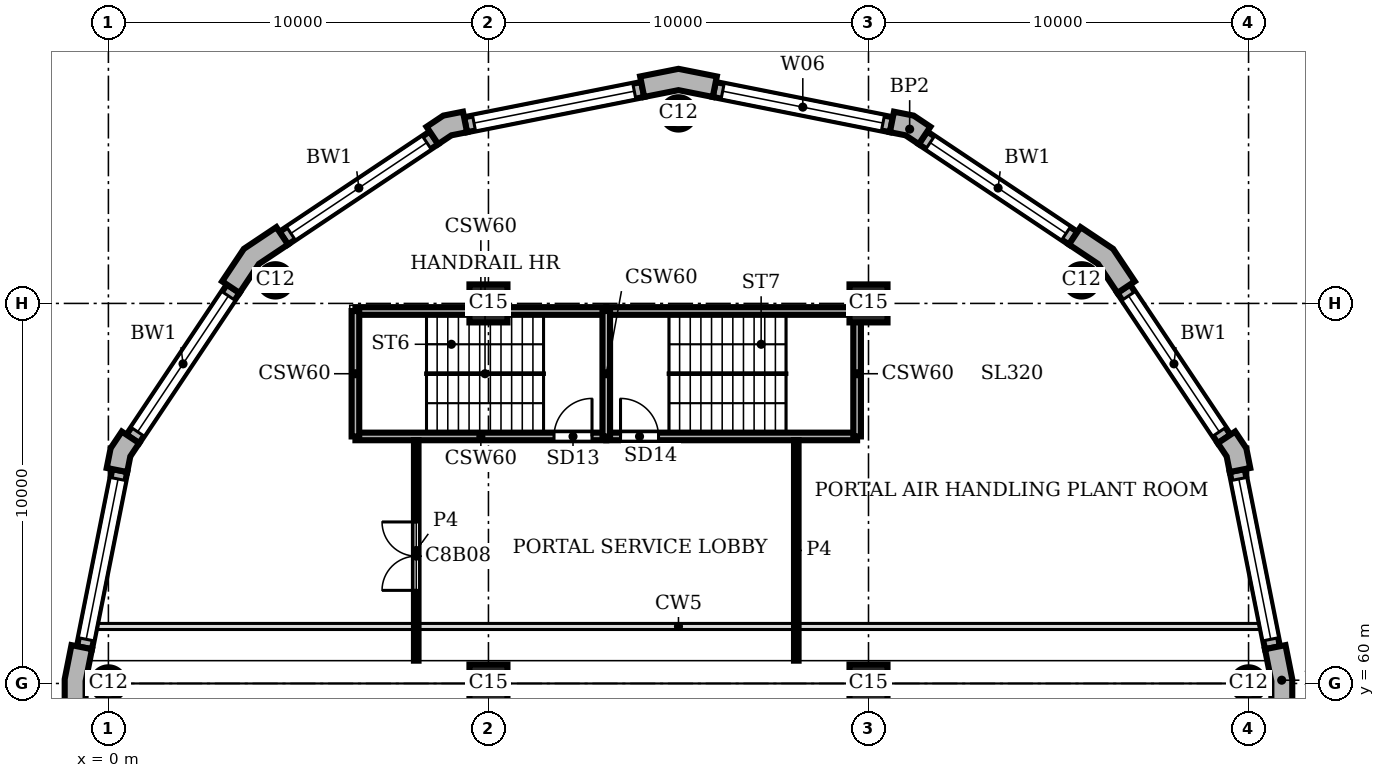
"""IFC4 building model, lengths in metres.
Left out: names, types, materials, properties, quantities, classifications, styles, units other than length and angle.
Written with IfcOpenShell. Run it as: python <this file> out.ifc"""

import sys

from ifc_helpers import new_model, si_unit, direction, frame, frame_2d, origin, origin_2d, place, context, subcontext, project, spatial, polyline, rectangle, circle, outline, extrude, element, fill, save


model = new_model("IFC4")
c1 = context("Model", 3, precision=1e-05, world=origin(), true_north=direction((0.0, 1.0)))
c2 = subcontext(c1, "Body", "Model", "MODEL_VIEW")
j1 = project(units=[si_unit("LENGTHUNIT", "METRE"), si_unit("PLANEANGLEUNIT", "RADIAN")], contexts=[c1])
p1 = place(None, origin())
s1 = spatial("IfcSite", under=j1, at=p1, CompositionType="ELEMENT")
p2 = place(p1, origin())
s2 = spatial("IfcBuilding", under=s1, at=p2, CompositionType="ELEMENT")
p3 = place(p2, frame((0.0, 0.0, 329.4)))
s3 = spatial("IfcBuildingStorey", under=s2, at=p3, CompositionType="ELEMENT", Elevation=329.4)
for number, where, z_axis, x_axis in (
    (1, (30.0, 60.0, 0.0), (0.0, 0.0, 1.0), (1.0, 0.0, 0.0)),
    (2, (25.607, 70.607, 0.0), (0.0, 0.0, 1.0), (1.0, 0.0, 0.0)),
    (3, (15.0, 75.0, 0.0), (0.0, 0.0, 1.0), (1.0, 0.0, 0.0)),
    (4, (4.393, 70.607, 0.0), (0.0, 0.0, 1.0), (1.0, 0.0, 0.0)),
    (5, (0.0, 60.0, 0.0), (0.0, 0.0, 1.0), (1.0, 0.0, 0.0)),
):
    element("IfcColumn", number, at=place(p3, frame(where, z_axis=z_axis, x_axis=x_axis)), inside=s3, PredefinedType="COLUMN", context=c2, shape_type="SweptSolid", body=[
        extrude(circle(Radius=0.425, at=origin_2d()), origin(), (0.0, 0.0, 1.0), 3.9),
    ])
for number, where, z_axis, x_axis in (
    (6, (10.0, 60.0, 0.0), (0.0, 0.0, 1.0), (1.0, 0.0, 0.0)),
    (7, (10.0, 70.0, 0.0), (0.0, 0.0, 1.0), (1.0, 0.0, 0.0)),
    (8, (20.0, 60.0, 0.0), (0.0, 0.0, 1.0), (1.0, 0.0, 0.0)),
    (9, (20.0, 70.0, 0.0), (0.0, 0.0, 1.0), (1.0, 0.0, 0.0)),
):
    element("IfcColumn", number, at=place(p3, frame(where, z_axis=z_axis, x_axis=x_axis)), inside=s3, PredefinedType="COLUMN", context=c2, shape_type="SweptSolid", body=[
        extrude(rectangle(XDim=1.0, YDim=1.0, at=origin_2d()), origin(), (0.0, 0.0, 1.0), 3.9),
    ])
p4 = place(p3, origin())
e10 = element("IfcWall", 10, at=p4, inside=s3, PredefinedType="SOLIDWALL", context=c2, shape_type="SweptSolid", body=[
    extrude(outline(polyline([(31.0, 59.2), (31.15, 59.2), (31.15, 60.113), (30.972, 61.009), (30.825, 60.98), (30.432, 60.902), (30.6, 60.059), (30.6, 59.2), (31.0, 59.2)])), origin(), (0.0, 0.0, 1.0), 3.9),
])
e11 = element("IfcWall", 11, at=p4, inside=s3, PredefinedType="SOLIDWALL", context=c2, shape_type="SweptSolid", body=[
    extrude(outline(polyline([(29.897, 65.641), (30.045, 65.67), (29.941, 66.189), (29.648, 66.629), (29.523, 66.545), (29.19, 66.323), (29.423, 65.974), (29.505, 65.563), (29.897, 65.641)])), origin(), (0.0, 0.0, 1.0), 3.9),
])
e12 = element("IfcWall", 12, at=p4, inside=s3, PredefinedType="SOLIDWALL", context=c2, shape_type="SweptSolid", body=[
    extrude(outline(polyline([(26.883, 70.497), (27.007, 70.58), (26.436, 71.436), (25.58, 72.007), (25.497, 71.883), (25.275, 71.55), (26.039, 71.039), (26.55, 70.275), (26.883, 70.497)])), origin(), (0.0, 0.0, 1.0), 3.9),
])
e13 = element("IfcWall", 13, at=p4, inside=s3, PredefinedType="SOLIDWALL", context=c2, shape_type="SweptSolid", body=[
    extrude(outline(polyline([(21.545, 74.523), (21.629, 74.648), (21.189, 74.941), (20.67, 75.045), (20.641, 74.897), (20.563, 74.505), (20.974, 74.423), (21.323, 74.19), (21.545, 74.523)])), origin(), (0.0, 0.0, 1.0), 3.9),
])
e14 = element("IfcWall", 14, at=p4, inside=s3, PredefinedType="SOLIDWALL", context=c2, shape_type="SweptSolid", body=[
    extrude(outline(polyline([(15.98, 75.825), (16.009, 75.972), (15.0, 76.173), (13.991, 75.972), (14.02, 75.825), (14.098, 75.432), (15.0, 75.612), (15.902, 75.432), (15.98, 75.825)])), origin(), (0.0, 0.0, 1.0), 3.9),
])
e15 = element("IfcWall", 15, at=p4, inside=s3, PredefinedType="SOLIDWALL", context=c2, shape_type="SweptSolid", body=[
    extrude(outline(polyline([(9.359, 74.897), (9.33, 75.045), (8.811, 74.941), (8.371, 74.648), (8.455, 74.523), (8.677, 74.19), (9.026, 74.423), (9.437, 74.505), (9.359, 74.897)])), origin(), (0.0, 0.0, 1.0), 3.9),
])
e16 = element("IfcWall", 16, at=p4, inside=s3, PredefinedType="SOLIDWALL", context=c2, shape_type="SweptSolid", body=[
    extrude(outline(polyline([(4.503, 71.883), (4.42, 72.007), (3.564, 71.436), (2.993, 70.58), (3.117, 70.497), (3.45, 70.275), (3.961, 71.039), (4.725, 71.55), (4.503, 71.883)])), origin(), (0.0, 0.0, 1.0), 3.9),
])
e17 = element("IfcWall", 17, at=p4, inside=s3, PredefinedType="SOLIDWALL", context=c2, shape_type="SweptSolid", body=[
    extrude(outline(polyline([(0.477, 66.545), (0.352, 66.629), (0.059, 66.189), (-0.045, 65.67), (0.103, 65.641), (0.495, 65.563), (0.577, 65.974), (0.81, 66.323), (0.477, 66.545)])), origin(), (0.0, 0.0, 1.0), 3.9),
])
e18 = element("IfcWall", 18, at=p4, inside=s3, PredefinedType="SOLIDWALL", context=c2, shape_type="SweptSolid", body=[
    extrude(outline(polyline([(-0.825, 60.98), (-0.972, 61.009), (-1.15, 60.113), (-1.15, 59.2), (-1.0, 59.2), (-0.6, 59.2), (-0.6, 60.059), (-0.432, 60.902), (-0.825, 60.98)])), origin(), (0.0, 0.0, 1.0), 3.9),
])
p5 = place(p3, frame((30.629, 60.941, 0.0), z_axis=(0.0, 0.0, 1.0), x_axis=(-0.195098533057, 0.98078364709, 0.0)))
e19 = element("IfcWall", 19, at=p5, inside=s3, PredefinedType="SOLIDWALL", context=c2, shape_type="SweptSolid", body=[
    extrude(rectangle(XDim=4.753, YDim=0.4, at=frame_2d((2.376, 0.0))), origin(), (0.0, 0.0, 1.0), 3.9),
])
p6 = place(p5, frame((0.226, 0.0, 0.9)))
e20 = element("IfcOpeningElement", 20, at=p6, cuts=e19, PredefinedType="OPENING", context=c2, shape_type="SweptSolid", body=[
    extrude(rectangle(XDim=4.3, YDim=2.35, at=frame_2d((2.15, 1.175))), frame((0.0, 0.21, 0.0), z_axis=(0.0, -1.0, 0.0), x_axis=(1.0, 0.0, 0.0)), (0.0, 0.0, 1.0), 0.42),
])
p7 = place(p3, frame((29.357, 66.434, 0.0), z_axis=(0.0, 0.0, 1.0), x_axis=(-0.555541552266, 0.831488775454, 0.0)))
e21 = element("IfcWall", 21, at=p7, inside=s3, PredefinedType="SOLIDWALL", context=c2, shape_type="SweptSolid", body=[
    extrude(rectangle(XDim=4.753, YDim=0.4, at=frame_2d((2.376, 0.0))), origin(), (0.0, 0.0, 1.0), 3.9),
])
p8 = place(p7, frame((0.226, 0.0, 0.9)))
e22 = element("IfcOpeningElement", 22, at=p8, cuts=e21, PredefinedType="OPENING", context=c2, shape_type="SweptSolid", body=[
    extrude(rectangle(XDim=4.3, YDim=2.35, at=frame_2d((2.15, 1.175))), frame((0.0, 0.21, 0.0), z_axis=(0.0, -1.0, 0.0), x_axis=(1.0, 0.0, 0.0)), (0.0, 0.0, 1.0), 0.42),
])
p9 = place(p3, frame((25.386, 71.716, 0.0), z_axis=(0.0, 0.0, 1.0), x_axis=(-0.831488775454, 0.555541552266, 0.0)))
e23 = element("IfcWall", 23, at=p9, inside=s3, PredefinedType="SOLIDWALL", context=c2, shape_type="SweptSolid", body=[
    extrude(rectangle(XDim=4.753, YDim=0.4, at=frame_2d((2.376, 0.0))), origin(), (0.0, 0.0, 1.0), 3.9),
])
p10 = place(p9, frame((0.226, 0.0, 0.9)))
e24 = element("IfcOpeningElement", 24, at=p10, cuts=e23, PredefinedType="OPENING", context=c2, shape_type="SweptSolid", body=[
    extrude(rectangle(XDim=4.3, YDim=2.35, at=frame_2d((2.15, 1.175))), frame((0.0, 0.21, 0.0), z_axis=(0.0, -1.0, 0.0), x_axis=(1.0, 0.0, 0.0)), (0.0, 0.0, 1.0), 0.42),
])
p11 = place(p3, frame((20.602, 74.701, 0.0), z_axis=(0.0, 0.0, 1.0), x_axis=(-0.98078364709, 0.195098533057, 0.0)))
e25 = element("IfcWall", 25, at=p11, inside=s3, PredefinedType="SOLIDWALL", context=c2, shape_type="SweptSolid", body=[
    extrude(rectangle(XDim=4.753, YDim=0.4, at=frame_2d((2.376, 0.0))), origin(), (0.0, 0.0, 1.0), 3.9),
])
p12 = place(p11, frame((0.226, 0.0, 0.9)))
e26 = element("IfcOpeningElement", 26, at=p12, cuts=e25, PredefinedType="OPENING", context=c2, shape_type="SweptSolid", body=[
    extrude(rectangle(XDim=4.3, YDim=2.35, at=frame_2d((2.15, 1.175))), frame((0.0, 0.21, 0.0), z_axis=(0.0, -1.0, 0.0), x_axis=(1.0, 0.0, 0.0)), (0.0, 0.0, 1.0), 0.42),
])
p13 = place(p3, frame((14.059, 75.629, 0.0), z_axis=(0.0, 0.0, 1.0), x_axis=(-0.98078364709, -0.195098533057, 0.0)))
e27 = element("IfcWall", 27, at=p13, inside=s3, PredefinedType="SOLIDWALL", context=c2, shape_type="SweptSolid", body=[
    extrude(rectangle(XDim=4.753, YDim=0.4, at=frame_2d((2.376, 0.0))), origin(), (0.0, 0.0, 1.0), 3.9),
])
p14 = place(p13, frame((0.226, 0.0, 0.9)))
e28 = element("IfcOpeningElement", 28, at=p14, cuts=e27, PredefinedType="OPENING", context=c2, shape_type="SweptSolid", body=[
    extrude(rectangle(XDim=4.3, YDim=2.35, at=frame_2d((2.15, 1.175))), frame((0.0, 0.21, 0.0), z_axis=(0.0, -1.0, 0.0), x_axis=(1.0, 0.0, 0.0)), (0.0, 0.0, 1.0), 0.42),
])
p15 = place(p3, frame((8.566, 74.357, 0.0), z_axis=(0.0, 0.0, 1.0), x_axis=(-0.831488775454, -0.555541552266, 0.0)))
e29 = element("IfcWall", 29, at=p15, inside=s3, PredefinedType="SOLIDWALL", context=c2, shape_type="SweptSolid", body=[
    extrude(rectangle(XDim=4.753, YDim=0.4, at=frame_2d((2.376, 0.0))), origin(), (0.0, 0.0, 1.0), 3.9),
])
p16 = place(p15, frame((0.226, 0.0, 0.9)))
e30 = element("IfcOpeningElement", 30, at=p16, cuts=e29, PredefinedType="OPENING", context=c2, shape_type="SweptSolid", body=[
    extrude(rectangle(XDim=4.3, YDim=2.35, at=frame_2d((2.15, 1.175))), frame((0.0, 0.21, 0.0), z_axis=(0.0, -1.0, 0.0), x_axis=(1.0, 0.0, 0.0)), (0.0, 0.0, 1.0), 0.42),
])
p17 = place(p3, frame((3.284, 70.386, 0.0), z_axis=(0.0, 0.0, 1.0), x_axis=(-0.555541552266, -0.831488775454, 0.0)))
e31 = element("IfcWall", 31, at=p17, inside=s3, PredefinedType="SOLIDWALL", context=c2, shape_type="SweptSolid", body=[
    extrude(rectangle(XDim=4.753, YDim=0.4, at=frame_2d((2.376, 0.0))), origin(), (0.0, 0.0, 1.0), 3.9),
])
p18 = place(p17, frame((0.226, 0.0, 0.9)))
e32 = element("IfcOpeningElement", 32, at=p18, cuts=e31, PredefinedType="OPENING", context=c2, shape_type="SweptSolid", body=[
    extrude(rectangle(XDim=4.3, YDim=2.35, at=frame_2d((2.15, 1.175))), frame((0.0, 0.21, 0.0), z_axis=(0.0, -1.0, 0.0), x_axis=(1.0, 0.0, 0.0)), (0.0, 0.0, 1.0), 0.42),
])
p19 = place(p3, frame((0.299, 65.602, 0.0), z_axis=(0.0, 0.0, 1.0), x_axis=(-0.195098533057, -0.98078364709, 0.0)))
e33 = element("IfcWall", 33, at=p19, inside=s3, PredefinedType="SOLIDWALL", context=c2, shape_type="SweptSolid", body=[
    extrude(rectangle(XDim=4.753, YDim=0.4, at=frame_2d((2.376, 0.0))), origin(), (0.0, 0.0, 1.0), 3.9),
])
p20 = place(p19, frame((0.226, 0.0, 0.9)))
e34 = element("IfcOpeningElement", 34, at=p20, cuts=e33, PredefinedType="OPENING", context=c2, shape_type="SweptSolid", body=[
    extrude(rectangle(XDim=4.3, YDim=2.35, at=frame_2d((2.15, 1.175))), frame((0.0, 0.21, 0.0), z_axis=(0.0, -1.0, 0.0), x_axis=(1.0, 0.0, 0.0)), (0.0, 0.0, 1.0), 0.42),
])
p21 = place(p3, frame((6.5, 66.5, 0.0), z_axis=(0.0, 0.0, 1.0), x_axis=(1.0, 0.0, 0.0)))
e35 = element("IfcWall", 35, at=p21, inside=s3, PredefinedType="SHEAR", context=c2, shape_type="SweptSolid", body=[
    extrude(rectangle(XDim=6.6, YDim=0.2, at=frame_2d((3.3, 0.0))), origin(), (0.0, 0.0, 1.0), 3.45),
])
p22 = place(p21, frame((5.225, 0.0, 0.0)))
e36 = element("IfcOpeningElement", 36, at=p22, cuts=e35, PredefinedType="OPENING", context=c2, shape_type="SweptSolid", body=[
    extrude(rectangle(XDim=1.0, YDim=2.1, at=frame_2d((0.5, 1.05))), frame((0.0, 0.11, 0.0), z_axis=(0.0, -1.0, 0.0), x_axis=(1.0, 0.0, 0.0)), (0.0, 0.0, 1.0), 0.22),
])
p23 = place(p3, frame((13.1, 66.5, 0.0), z_axis=(0.0, 0.0, 1.0), x_axis=(1.0, 0.0, 0.0)))
e37 = element("IfcWall", 37, at=p23, inside=s3, PredefinedType="SHEAR", context=c2, shape_type="SweptSolid", body=[
    extrude(rectangle(XDim=6.6, YDim=0.2, at=frame_2d((3.3, 0.0))), origin(), (0.0, 0.0, 1.0), 3.45),
])
p24 = place(p23, frame((0.375, 0.0, 0.0)))
e38 = element("IfcOpeningElement", 38, at=p24, cuts=e37, PredefinedType="OPENING", context=c2, shape_type="SweptSolid", body=[
    extrude(rectangle(XDim=1.0, YDim=2.1, at=frame_2d((0.5, 1.05))), frame((0.0, 0.11, 0.0), z_axis=(0.0, -1.0, 0.0), x_axis=(1.0, 0.0, 0.0)), (0.0, 0.0, 1.0), 0.22),
])
p25 = place(p3, frame((6.5, 69.8, 0.0), z_axis=(0.0, 0.0, 1.0), x_axis=(1.0, 0.0, 0.0)))
e39 = element("IfcWall", 39, at=p25, inside=s3, PredefinedType="SHEAR", context=c2, shape_type="SweptSolid", body=[
    extrude(rectangle(XDim=6.6, YDim=0.2, at=frame_2d((3.3, 0.0))), origin(), (0.0, 0.0, 1.0), 3.45),
])
p26 = place(p3, frame((13.1, 69.8, 0.0), z_axis=(0.0, 0.0, 1.0), x_axis=(1.0, 0.0, 0.0)))
e40 = element("IfcWall", 40, at=p26, inside=s3, PredefinedType="SHEAR", context=c2, shape_type="SweptSolid", body=[
    extrude(rectangle(XDim=6.6, YDim=0.2, at=frame_2d((3.3, 0.0))), origin(), (0.0, 0.0, 1.0), 3.45),
])
for number, where, z_axis, x_axis in (
    (41, (6.5, 66.5, 0.0), (0.0, 0.0, 1.0), (0.0, 1.0, 0.0)),
    (42, (13.1, 66.5, 0.0), (0.0, 0.0, 1.0), (0.0, 1.0, 0.0)),
    (43, (19.7, 66.5, 0.0), (0.0, 0.0, 1.0), (0.0, 1.0, 0.0)),
):
    element("IfcWall", number, at=place(p3, frame(where, z_axis=z_axis, x_axis=x_axis)), inside=s3, PredefinedType="SHEAR", context=c2, shape_type="SweptSolid", body=[
        extrude(rectangle(XDim=3.3, YDim=0.2, at=frame_2d((1.65, 0.0))), origin(), (0.0, 0.0, 1.0), 3.45),
    ])
p27 = place(p3, frame((8.1, 60.6, 0.0), z_axis=(0.0, 0.0, 1.0), x_axis=(0.0, 1.0, 0.0)))
e44 = element("IfcWall", 44, at=p27, inside=s3, PredefinedType="PARTITIONING", context=c2, shape_type="SweptSolid", body=[
    extrude(rectangle(XDim=5.8, YDim=0.12, at=frame_2d((2.9, 0.0))), origin(), (0.0, 0.0, 1.0), 3.45),
])
p28 = place(p27, frame((1.85, 0.0, 0.0)))
e45 = element("IfcOpeningElement", 45, at=p28, cuts=e44, PredefinedType="OPENING", context=c2, shape_type="SweptSolid", body=[
    extrude(rectangle(XDim=1.8, YDim=2.1, at=frame_2d((0.9, 1.05))), frame((0.0, 0.07, 0.0), z_axis=(0.0, -1.0, 0.0), x_axis=(1.0, 0.0, 0.0)), (0.0, 0.0, 1.0), 0.14),
])
p29 = place(p3, frame((18.1, 60.6, 0.0), z_axis=(0.0, 0.0, 1.0), x_axis=(0.0, 1.0, 0.0)))
e46 = element("IfcWall", 46, at=p29, inside=s3, PredefinedType="PARTITIONING", context=c2, shape_type="SweptSolid", body=[
    extrude(rectangle(XDim=5.8, YDim=0.12, at=frame_2d((2.9, 0.0))), origin(), (0.0, 0.0, 1.0), 3.45),
])
p30 = place(p6, origin())
e47 = element("IfcWindow", 47, at=p30, inside=s3, PartitioningType="SINGLE_PANEL", PredefinedType="WINDOW", context=c2, shape_type="SweptSolid", body=[
    extrude(rectangle(XDim=4.3, YDim=2.35, at=frame_2d((2.15, 1.175))), frame((0.0, 0.16, 0.0), z_axis=(0.0, -1.0, 0.0), x_axis=(1.0, 0.0, 0.0)), (0.0, 0.0, 1.0), 0.06),
])
fill(e20, e47)
p31 = place(p8, origin())
e48 = element("IfcWindow", 48, at=p31, inside=s3, PartitioningType="SINGLE_PANEL", PredefinedType="WINDOW", context=c2, shape_type="SweptSolid", body=[
    extrude(rectangle(XDim=4.3, YDim=2.35, at=frame_2d((2.15, 1.175))), frame((0.0, 0.16, 0.0), z_axis=(0.0, -1.0, 0.0), x_axis=(1.0, 0.0, 0.0)), (0.0, 0.0, 1.0), 0.06),
])
fill(e22, e48)
p32 = place(p10, origin())
e49 = element("IfcWindow", 49, at=p32, inside=s3, PartitioningType="SINGLE_PANEL", PredefinedType="WINDOW", context=c2, shape_type="SweptSolid", body=[
    extrude(rectangle(XDim=4.3, YDim=2.35, at=frame_2d((2.15, 1.175))), frame((0.0, 0.16, 0.0), z_axis=(0.0, -1.0, 0.0), x_axis=(1.0, 0.0, 0.0)), (0.0, 0.0, 1.0), 0.06),
])
fill(e24, e49)
p33 = place(p12, origin())
e50 = element("IfcWindow", 50, at=p33, inside=s3, PartitioningType="SINGLE_PANEL", PredefinedType="WINDOW", context=c2, shape_type="SweptSolid", body=[
    extrude(rectangle(XDim=4.3, YDim=2.35, at=frame_2d((2.15, 1.175))), frame((0.0, 0.16, 0.0), z_axis=(0.0, -1.0, 0.0), x_axis=(1.0, 0.0, 0.0)), (0.0, 0.0, 1.0), 0.06),
])
fill(e26, e50)
p34 = place(p14, origin())
e51 = element("IfcWindow", 51, at=p34, inside=s3, PartitioningType="SINGLE_PANEL", PredefinedType="WINDOW", context=c2, shape_type="SweptSolid", body=[
    extrude(rectangle(XDim=4.3, YDim=2.35, at=frame_2d((2.15, 1.175))), frame((0.0, 0.16, 0.0), z_axis=(0.0, -1.0, 0.0), x_axis=(1.0, 0.0, 0.0)), (0.0, 0.0, 1.0), 0.06),
])
fill(e28, e51)
p35 = place(p16, origin())
e52 = element("IfcWindow", 52, at=p35, inside=s3, PartitioningType="SINGLE_PANEL", PredefinedType="WINDOW", context=c2, shape_type="SweptSolid", body=[
    extrude(rectangle(XDim=4.3, YDim=2.35, at=frame_2d((2.15, 1.175))), frame((0.0, 0.16, 0.0), z_axis=(0.0, -1.0, 0.0), x_axis=(1.0, 0.0, 0.0)), (0.0, 0.0, 1.0), 0.06),
])
fill(e30, e52)
p36 = place(p18, origin())
e53 = element("IfcWindow", 53, at=p36, inside=s3, PartitioningType="SINGLE_PANEL", PredefinedType="WINDOW", context=c2, shape_type="SweptSolid", body=[
    extrude(rectangle(XDim=4.3, YDim=2.35, at=frame_2d((2.15, 1.175))), frame((0.0, 0.16, 0.0), z_axis=(0.0, -1.0, 0.0), x_axis=(1.0, 0.0, 0.0)), (0.0, 0.0, 1.0), 0.06),
])
fill(e32, e53)
p37 = place(p20, origin())
e54 = element("IfcWindow", 54, at=p37, inside=s3, PartitioningType="SINGLE_PANEL", PredefinedType="WINDOW", context=c2, shape_type="SweptSolid", body=[
    extrude(rectangle(XDim=4.3, YDim=2.35, at=frame_2d((2.15, 1.175))), frame((0.0, 0.16, 0.0), z_axis=(0.0, -1.0, 0.0), x_axis=(1.0, 0.0, 0.0)), (0.0, 0.0, 1.0), 0.06),
])
fill(e34, e54)
p38 = place(p22, origin())
e55 = element("IfcDoor", 55, at=p38, inside=s3, OperationType="SINGLE_SWING_RIGHT", PredefinedType="DOOR", context=c2, shape_type="SweptSolid", body=[
    extrude(rectangle(XDim=1.0, YDim=2.1, at=frame_2d((0.5, 1.05))), frame((0.0, 0.025, 0.0), z_axis=(0.0, -1.0, 0.0), x_axis=(1.0, 0.0, 0.0)), (0.0, 0.0, 1.0), 0.05),
])
fill(e36, e55)
p39 = place(p24, origin())
e56 = element("IfcDoor", 56, at=p39, inside=s3, OperationType="SINGLE_SWING_LEFT", PredefinedType="DOOR", context=c2, shape_type="SweptSolid", body=[
    extrude(rectangle(XDim=1.0, YDim=2.1, at=frame_2d((0.5, 1.05))), frame((0.0, 0.025, 0.0), z_axis=(0.0, -1.0, 0.0), x_axis=(1.0, 0.0, 0.0)), (0.0, 0.0, 1.0), 0.05),
])
fill(e38, e56)
p40 = place(p28, origin())
e57 = element("IfcDoor", 57, at=p40, inside=s3, OperationType="DOUBLE_DOOR_SINGLE_SWING", PredefinedType="DOOR", context=c2, shape_type="SweptSolid", body=[
    extrude(rectangle(XDim=1.8, YDim=2.1, at=frame_2d((0.9, 1.05))), frame((0.0, 0.025, 0.0), z_axis=(0.0, -1.0, 0.0), x_axis=(1.0, 0.0, 0.0)), (0.0, 0.0, 1.0), 0.05),
])
fill(e45, e57)
save(model, sys.argv[1])
